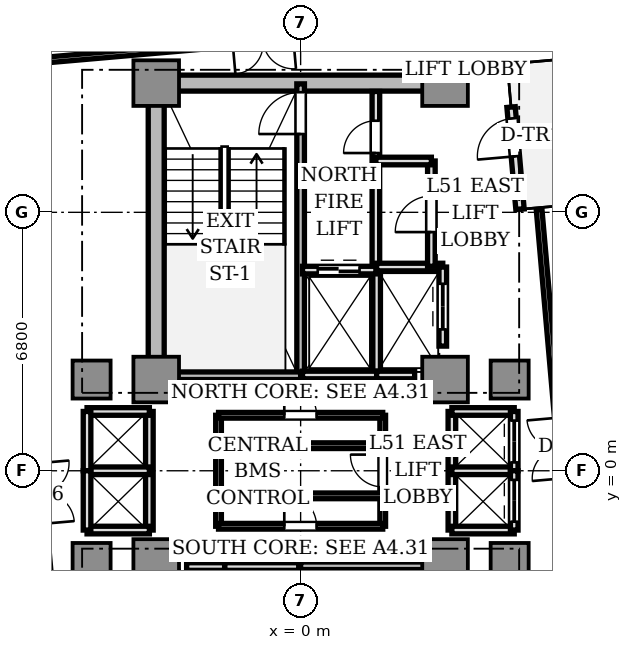
"""IFC4 building model, lengths in metres.
Left out: names, types, materials, properties, quantities, classifications, styles, units other than length and angle.
Written with IfcOpenShell. Run it as: python <this file> out.ifc"""

import sys

from ifc_helpers import new_model, si_unit, direction, frame, frame_2d, origin, origin_2d, place, context, subcontext, project, spatial, rectangle, extrude, source, transform, mapped, element, fill, save


model = new_model("IFC4")
c1 = context("Model", 3, precision=1e-05, world=origin(), true_north=direction((0.0, 1.0)))
c2 = subcontext(c1, "Body", "Model", "MODEL_VIEW")
j1 = project(units=[si_unit("LENGTHUNIT", "METRE"), si_unit("PLANEANGLEUNIT", "RADIAN")], contexts=[c1])
p1 = place(None, origin())
s1 = spatial("IfcSite", under=j1, at=p1, CompositionType="ELEMENT")
p2 = place(p1, origin())
s2 = spatial("IfcBuilding", under=s1, at=p2, CompositionType="ELEMENT")
p3 = place(p2, frame((0.0, 0.0, 185.25)))
s3 = spatial("IfcBuildingStorey", under=s2, at=p3, CompositionType="ELEMENT", Elevation=185.25)
p4 = place(p3, frame((-3.55, 10.2, 0.0), z_axis=(0.0, 0.0, 1.0), x_axis=(1.0, 0.0, 0.0)))
e1 = element("IfcWall", 1, at=p4, inside=s3, PredefinedType="SHEAR", context=c2, shape_type="SweptSolid", body=[
    extrude(rectangle(XDim=7.1, YDim=0.42, at=frame_2d((3.55, 0.0))), origin(), (0.0, 0.0, 1.0), 3.11),
])
p5 = place(p3, frame((-3.8, 2.85, 0.0), z_axis=(0.0, 0.0, 1.0), x_axis=(0.0, 1.0, 0.0)))
e2 = element("IfcWall", 2, at=p5, inside=s3, PredefinedType="SHEAR", context=c2, shape_type="SweptSolid", body=[
    extrude(rectangle(XDim=6.9, YDim=0.42, at=frame_2d((3.45, 0.0))), origin(), (0.0, 0.0, 1.0), 3.11),
])
m1 = source(origin(), c2, "Body", "SweptSolid", [
    extrude(rectangle(XDim=1.2, YDim=1.2, at=origin_2d()), origin(), (0.0, 0.0, 1.0), 3.11),
])
for number, where, z_axis, x_axis in (
    (3, (-3.8, 2.4, 0.0), (0.0, 0.0, 1.0), (1.0, 0.0, 0.0)),
    (4, (3.8, 2.4, 0.0), (0.0, 0.0, 1.0), (1.0, 0.0, 0.0)),
    (5, (-3.8, 10.2, 0.0), (0.0, 0.0, 1.0), (1.0, 0.0, 0.0)),
    (6, (3.8, 10.2, 0.0), (0.0, 0.0, 1.0), (1.0, 0.0, 0.0)),
    (7, (-3.8, -2.4, 0.0), (0.0, 0.0, 1.0), (1.0, 0.0, 0.0)),
    (8, (3.8, -2.4, 0.0), (0.0, 0.0, 1.0), (1.0, 0.0, 0.0)),
):
    element("IfcColumn", number, at=place(p3, frame(where, z_axis=z_axis, x_axis=x_axis)), inside=s3, PredefinedType="COLUMN", context=c2, shape_type="MappedRepresentation", body=[
        mapped(m1, transform((0.0, 0.0, 0.0), scale=1.0)),
    ])
m2 = source(origin(), c2, "Body", "SweptSolid", [
    extrude(rectangle(XDim=1.0, YDim=1.0, at=origin_2d()), origin(), (0.0, 0.0, 1.0), 3.11),
])
for number, where, z_axis, x_axis in (
    (9, (5.5, 2.4, 0.0), (0.0, 0.0, 1.0), (1.0, 0.0, 0.0)),
    (10, (-5.5, 2.4, 0.0), (0.0, 0.0, 1.0), (1.0, 0.0, 0.0)),
    (11, (5.5, -2.4, 0.0), (0.0, 0.0, 1.0), (1.0, 0.0, 0.0)),
    (12, (-5.5, -2.4, 0.0), (0.0, 0.0, 1.0), (1.0, 0.0, 0.0)),
):
    element("IfcColumn", number, at=place(p3, frame(where, z_axis=z_axis, x_axis=x_axis)), inside=s3, PredefinedType="COLUMN", context=c2, shape_type="MappedRepresentation", body=[
        mapped(m2, transform((0.0, 0.0, 0.0), scale=1.0)),
    ])
p6 = place(p3, frame((5.772, 6.879, 0.0), z_axis=(0.0, 0.0, 1.0), x_axis=(-0.087168071984, 0.996193619346, 0.0)))
e13 = element("IfcWall", 13, at=p6, inside=s3, PredefinedType="STANDARD", context=c2, shape_type="SweptSolid", body=[
    extrude(rectangle(XDim=2.7, YDim=0.22, at=frame_2d((1.35, 0.0))), origin(), (0.0, 0.0, 1.0), 3.11),
])
p7 = place(p6, frame((1.4, 0.0, 0.0)))
e14 = element("IfcOpeningElement", 14, at=p7, cuts=e13, PredefinedType="OPENING", context=c2, shape_type="SweptSolid", body=[
    extrude(rectangle(XDim=1.0, YDim=2.2, at=frame_2d((0.5, 1.1))), frame((0.0, 0.12, 0.0), z_axis=(0.0, -1.0, 0.0), x_axis=(1.0, 0.0, 0.0)), (0.0, 0.0, 1.0), 0.24),
])
p8 = place(p3, frame((0.0, 2.5, 0.0), z_axis=(0.0, 0.0, 1.0), x_axis=(0.0, 1.0, 0.0)))
e15 = element("IfcWall", 15, at=p8, inside=s3, PredefinedType="SOLIDWALL", context=c2, shape_type="SweptSolid", body=[
    extrude(rectangle(XDim=7.68, YDim=0.2, at=frame_2d((3.84, 0.0))), origin(), (0.0, 0.0, 1.0), 3.11),
])
p9 = place(p8, frame((6.36, 0.0, 0.0)))
e16 = element("IfcOpeningElement", 16, at=p9, cuts=e15, PredefinedType="OPENING", context=c2, shape_type="SweptSolid", body=[
    extrude(rectangle(XDim=1.1, YDim=2.15, at=frame_2d((0.55, 1.075))), frame((0.0, 0.11, 0.0), z_axis=(0.0, -1.0, 0.0), x_axis=(1.0, 0.0, 0.0)), (0.0, 0.0, 1.0), 0.22),
])
p10 = place(p3, frame((-3.72, 2.5, 0.0), z_axis=(0.0, 0.0, 1.0), x_axis=(1.0, 0.0, 0.0)))
e17 = element("IfcWall", 17, at=p10, inside=s3, PredefinedType="SOLIDWALL", context=c2, shape_type="SweptSolid", body=[
    extrude(rectangle(XDim=3.72, YDim=0.2, at=frame_2d((1.86, 0.0))), origin(), (0.0, 0.0, 1.0), 3.11),
])
p11 = place(p3, frame((0.0, -10.18, 0.0), z_axis=(0.0, 0.0, 1.0), x_axis=(0.0, 1.0, 0.0)))
e18 = element("IfcWall", 18, at=p11, inside=s3, PredefinedType="SOLIDWALL", context=c2, shape_type="SweptSolid", body=[
    extrude(rectangle(XDim=7.68, YDim=0.2, at=frame_2d((3.84, 0.0))), origin(), (0.0, 0.0, 1.0), 3.11),
])
p12 = place(p11, frame((0.28, 0.0, 0.0)))
e19 = element("IfcOpeningElement", 19, at=p12, cuts=e18, PredefinedType="OPENING", context=c2, shape_type="SweptSolid", body=[
    extrude(rectangle(XDim=1.1, YDim=2.15, at=frame_2d((0.55, 1.075))), frame((0.0, 0.11, 0.0), z_axis=(0.0, -1.0, 0.0), x_axis=(1.0, 0.0, 0.0)), (0.0, 0.0, 1.0), 0.22),
])
p13 = place(p3, frame((0.0, -2.5, 0.0), z_axis=(0.0, 0.0, 1.0), x_axis=(1.0, 0.0, 0.0)))
e20 = element("IfcWall", 20, at=p13, inside=s3, PredefinedType="SOLIDWALL", context=c2, shape_type="SweptSolid", body=[
    extrude(rectangle(XDim=3.72, YDim=0.2, at=frame_2d((1.86, 0.0))), origin(), (0.0, 0.0, 1.0), 3.11),
])
p14 = place(p3, frame((1.98, 5.32, 0.0), z_axis=(0.0, 0.0, 1.0), x_axis=(0.0, 1.0, 0.0)))
e21 = element("IfcWall", 21, at=p14, inside=s3, PredefinedType="SOLIDWALL", context=c2, shape_type="SweptSolid", body=[
    extrude(rectangle(XDim=4.66, YDim=0.2, at=frame_2d((2.33, 0.0))), origin(), (0.0, 0.0, 1.0), 2.66),
])
p15 = place(p14, frame((3.04, 0.0, 0.0)))
e22 = element("IfcOpeningElement", 22, at=p15, cuts=e21, PredefinedType="OPENING", context=c2, shape_type="SweptSolid", body=[
    extrude(rectangle(XDim=0.85, YDim=2.1, at=frame_2d((0.425, 1.05))), frame((0.0, 0.11, 0.0), z_axis=(0.0, -1.0, 0.0), x_axis=(1.0, 0.0, 0.0)), (0.0, 0.0, 1.0), 0.22),
])
p16 = place(p3, frame((2.0, 2.5, 0.0), z_axis=(0.0, 0.0, 1.0), x_axis=(0.0, 1.0, 0.0)))
e23 = element("IfcWall", 23, at=p16, inside=s3, PredefinedType="SOLIDWALL", context=c2, shape_type="SweptSolid", body=[
    extrude(rectangle(XDim=2.78, YDim=0.2, at=frame_2d((1.39, 0.0))), origin(), (0.0, 0.0, 1.0), 2.66),
])
p17 = place(p3, frame((0.05, 2.52, 0.0), z_axis=(0.0, 0.0, 1.0), x_axis=(1.0, 0.0, 0.0)))
e24 = element("IfcWall", 24, at=p17, inside=s3, PredefinedType="SOLIDWALL", context=c2, shape_type="SweptSolid", body=[
    extrude(rectangle(XDim=1.95, YDim=0.2, at=frame_2d((0.975, 0.0))), origin(), (0.0, 0.0, 1.0), 2.66),
])
p18 = place(p3, frame((0.05, 5.28, 0.0), z_axis=(0.0, 0.0, 1.0), x_axis=(1.0, 0.0, 0.0)))
e25 = element("IfcWall", 25, at=p18, inside=s3, PredefinedType="SOLIDWALL", context=c2, shape_type="SweptSolid", body=[
    extrude(rectangle(XDim=1.93, YDim=0.2, at=frame_2d((0.965, 0.0))), origin(), (0.0, 0.0, 1.0), 2.66),
])
p19 = place(p18, frame((0.4, 0.0, 0.0)))
e26 = element("IfcOpeningElement", 26, at=p19, cuts=e25, PredefinedType="OPENING", context=c2, shape_type="SweptSolid", body=[
    extrude(rectangle(XDim=1.1, YDim=2.2, at=frame_2d((0.55, 1.1))), frame((0.0, 0.11, 0.0), z_axis=(0.0, -1.0, 0.0), x_axis=(1.0, 0.0, 0.0)), (0.0, 0.0, 1.0), 0.22),
])
p20 = place(p3, frame((-2.0, -5.28, 0.0), z_axis=(0.0, 0.0, 1.0), x_axis=(0.0, 1.0, 0.0)))
e27 = element("IfcWall", 27, at=p20, inside=s3, PredefinedType="SOLIDWALL", context=c2, shape_type="SweptSolid", body=[
    extrude(rectangle(XDim=2.78, YDim=0.2, at=frame_2d((1.39, 0.0))), origin(), (0.0, 0.0, 1.0), 2.66),
])
p21 = place(p3, frame((-2.0, -2.52, 0.0), z_axis=(0.0, 0.0, 1.0), x_axis=(1.0, 0.0, 0.0)))
e28 = element("IfcWall", 28, at=p21, inside=s3, PredefinedType="SOLIDWALL", context=c2, shape_type="SweptSolid", body=[
    extrude(rectangle(XDim=1.95, YDim=0.2, at=frame_2d((0.975, 0.0))), origin(), (0.0, 0.0, 1.0), 2.66),
])
p22 = place(p3, frame((2.0, 2.52, 0.0), z_axis=(0.0, 0.0, 1.0), x_axis=(1.0, 0.0, 0.0)))
e29 = element("IfcWall", 29, at=p22, inside=s3, PredefinedType="SOLIDWALL", context=c2, shape_type="SweptSolid", body=[
    extrude(rectangle(XDim=1.0, YDim=0.2, at=frame_2d((0.5, 0.0))), origin(), (0.0, 0.0, 1.0), 2.66),
])
p23 = place(p3, frame((2.0, 5.36, 0.0), z_axis=(0.0, 0.0, 1.0), x_axis=(1.0, 0.0, 0.0)))
e30 = element("IfcWall", 30, at=p23, inside=s3, PredefinedType="SOLIDWALL", context=c2, shape_type="SweptSolid", body=[
    extrude(rectangle(XDim=1.74, YDim=0.2, at=frame_2d((0.87, 0.0))), origin(), (0.0, 0.0, 1.0), 2.66),
])
p24 = place(p3, frame((3.74, 3.28, 0.0), z_axis=(0.0, 0.0, 1.0), x_axis=(0.0, 1.0, 0.0)))
e31 = element("IfcWall", 31, at=p24, inside=s3, PredefinedType="SOLIDWALL", context=c2, shape_type="SweptSolid", body=[
    extrude(rectangle(XDim=2.08, YDim=0.2, at=frame_2d((1.04, 0.0))), origin(), (0.0, 0.0, 1.0), 2.66),
])
p25 = place(p24, frame((0.44, 0.0, 0.0)))
e32 = element("IfcOpeningElement", 32, at=p25, cuts=e31, PredefinedType="OPENING", context=c2, shape_type="SweptSolid", body=[
    extrude(rectangle(XDim=1.2, YDim=2.2, at=frame_2d((0.6, 1.1))), frame((0.0, 0.11, 0.0), z_axis=(0.0, -1.0, 0.0), x_axis=(1.0, 0.0, 0.0)), (0.0, 0.0, 1.0), 0.22),
])
p26 = place(p3, frame((-3.0, -2.52, 0.0), z_axis=(0.0, 0.0, 1.0), x_axis=(1.0, 0.0, 0.0)))
e33 = element("IfcWall", 33, at=p26, inside=s3, PredefinedType="SOLIDWALL", context=c2, shape_type="SweptSolid", body=[
    extrude(rectangle(XDim=1.0, YDim=0.2, at=frame_2d((0.5, 0.0))), origin(), (0.0, 0.0, 1.0), 2.66),
])
p27 = place(p3, frame((3.98, -1.56, 0.0), z_axis=(0.0, 0.0, 1.0), x_axis=(0.0, 1.0, 0.0)))
e34 = element("IfcWall", 34, at=p27, inside=s3, PredefinedType="SOLIDWALL", context=c2, shape_type="SweptSolid", body=[
    extrude(rectangle(XDim=3.12, YDim=0.2, at=frame_2d((1.56, 0.0))), origin(), (0.0, 0.0, 1.0), 2.28),
])
for number, where, z_axis, x_axis in (
    (35, (3.98, 1.56, 0.0), (0.0, 0.0, 1.0), (1.0, 0.0, 0.0)),
    (36, (3.98, -1.56, 0.0), (0.0, 0.0, 1.0), (1.0, 0.0, 0.0)),
    (37, (3.98, 0.0, 0.0), (0.0, 0.0, 1.0), (1.0, 0.0, 0.0)),
):
    element("IfcWall", number, at=place(p3, frame(where, z_axis=z_axis, x_axis=x_axis)), inside=s3, PredefinedType="SOLIDWALL", context=c2, shape_type="SweptSolid", body=[
        extrude(rectangle(XDim=1.64, YDim=0.2, at=frame_2d((0.82, 0.0))), origin(), (0.0, 0.0, 1.0), 2.66),
    ])
p28 = place(p3, frame((5.62, 0.0, 0.0), z_axis=(0.0, 0.0, 1.0), x_axis=(0.0, 1.0, 0.0)))
e38 = element("IfcWall", 38, at=p28, inside=s3, PredefinedType="SOLIDWALL", context=c2, shape_type="SweptSolid", body=[
    extrude(rectangle(XDim=1.56, YDim=0.2, at=frame_2d((0.78, 0.0))), origin(), (0.0, 0.0, 1.0), 2.66),
])
p29 = place(p28, frame((0.22, 0.0, 0.0)))
e39 = element("IfcOpeningElement", 39, at=p29, cuts=e38, PredefinedType="OPENING", context=c2, shape_type="SweptSolid", body=[
    extrude(rectangle(XDim=1.1, YDim=2.2, at=frame_2d((0.55, 1.1))), frame((0.0, 0.11, 0.0), z_axis=(0.0, -1.0, 0.0), x_axis=(1.0, 0.0, 0.0)), (0.0, 0.0, 1.0), 0.22),
])
p30 = place(p3, frame((5.62, -1.56, 0.0), z_axis=(0.0, 0.0, 1.0), x_axis=(0.0, 1.0, 0.0)))
e40 = element("IfcWall", 40, at=p30, inside=s3, PredefinedType="SOLIDWALL", context=c2, shape_type="SweptSolid", body=[
    extrude(rectangle(XDim=1.56, YDim=0.2, at=frame_2d((0.78, 0.0))), origin(), (0.0, 0.0, 1.0), 2.66),
])
p31 = place(p30, frame((0.22, 0.0, 0.0)))
e41 = element("IfcOpeningElement", 41, at=p31, cuts=e40, PredefinedType="OPENING", context=c2, shape_type="SweptSolid", body=[
    extrude(rectangle(XDim=1.1, YDim=2.2, at=frame_2d((0.55, 1.1))), frame((0.0, 0.11, 0.0), z_axis=(0.0, -1.0, 0.0), x_axis=(1.0, 0.0, 0.0)), (0.0, 0.0, 1.0), 0.22),
])
p32 = place(p3, frame((-3.98, -1.56, 0.0), z_axis=(0.0, 0.0, 1.0), x_axis=(0.0, 1.0, 0.0)))
e42 = element("IfcWall", 42, at=p32, inside=s3, PredefinedType="SOLIDWALL", context=c2, shape_type="SweptSolid", body=[
    extrude(rectangle(XDim=3.12, YDim=0.2, at=frame_2d((1.56, 0.0))), origin(), (0.0, 0.0, 1.0), 2.28),
])
for number, where, z_axis, x_axis in (
    (43, (-5.62, 1.56, 0.0), (0.0, 0.0, 1.0), (1.0, 0.0, 0.0)),
    (44, (-5.62, -1.56, 0.0), (0.0, 0.0, 1.0), (1.0, 0.0, 0.0)),
    (45, (-5.62, 0.0, 0.0), (0.0, 0.0, 1.0), (1.0, 0.0, 0.0)),
):
    element("IfcWall", number, at=place(p3, frame(where, z_axis=z_axis, x_axis=x_axis)), inside=s3, PredefinedType="SOLIDWALL", context=c2, shape_type="SweptSolid", body=[
        extrude(rectangle(XDim=1.64, YDim=0.2, at=frame_2d((0.82, 0.0))), origin(), (0.0, 0.0, 1.0), 2.66),
    ])
for number, where, z_axis, x_axis in (
    (46, (-5.62, 0.0, 0.0), (0.0, 0.0, 1.0), (0.0, 1.0, 0.0)),
    (47, (-5.62, -1.56, 0.0), (0.0, 0.0, 1.0), (0.0, 1.0, 0.0)),
):
    element("IfcWall", number, at=place(p3, frame(where, z_axis=z_axis, x_axis=x_axis)), inside=s3, PredefinedType="SOLIDWALL", context=c2, shape_type="SweptSolid", body=[
        extrude(rectangle(XDim=1.56, YDim=0.2, at=frame_2d((0.78, 0.0))), origin(), (0.0, 0.0, 1.0), 2.66),
    ])
p33 = place(p3, frame((3.44, 5.38, 0.0), z_axis=(0.0, 0.0, 1.0), x_axis=(0.0, 1.0, 0.0)))
e48 = element("IfcWall", 48, at=p33, inside=s3, PredefinedType="SOLIDWALL", context=c2, shape_type="SweptSolid", body=[
    extrude(rectangle(XDim=2.77, YDim=0.2, at=frame_2d((1.385, 0.0))), origin(), (0.0, 0.0, 1.0), 2.66),
])
p34 = place(p33, frame((0.9, 0.0, 0.0)))
e49 = element("IfcOpeningElement", 49, at=p34, cuts=e48, PredefinedType="OPENING", context=c2, shape_type="SweptSolid", body=[
    extrude(rectangle(XDim=0.95, YDim=2.15, at=frame_2d((0.475, 1.075))), frame((0.0, 0.11, 0.0), z_axis=(0.0, -1.0, 0.0), x_axis=(1.0, 0.0, 0.0)), (0.0, 0.0, 1.0), 0.22),
])
p35 = place(p3, frame((1.98, 8.15, 0.0), z_axis=(0.0, 0.0, 1.0), x_axis=(1.0, 0.0, 0.0)))
e50 = element("IfcWall", 50, at=p35, inside=s3, PredefinedType="SOLIDWALL", context=c2, shape_type="SweptSolid", body=[
    extrude(rectangle(XDim=1.46, YDim=0.2, at=frame_2d((0.73, 0.0))), origin(), (0.0, 0.0, 1.0), 2.66),
])
p36 = place(p3, frame((2.16, -1.46, 0.0), z_axis=(0.0, 0.0, 1.0), x_axis=(0.0, 1.0, 0.0)))
e51 = element("IfcWall", 51, at=p36, inside=s3, PredefinedType="PARTITIONING", context=c2, shape_type="SweptSolid", body=[
    extrude(rectangle(XDim=2.92, YDim=0.15, at=frame_2d((1.46, 0.0))), origin(), (0.0, 0.0, 1.0), 2.66),
])
p37 = place(p36, frame((1.035, 0.0, 0.0)))
e52 = element("IfcOpeningElement", 52, at=p37, cuts=e51, PredefinedType="OPENING", context=c2, shape_type="SweptSolid", body=[
    extrude(rectangle(XDim=0.85, YDim=2.1, at=frame_2d((0.425, 1.05))), frame((0.0, 0.085, 0.0), z_axis=(0.0, -1.0, 0.0), x_axis=(1.0, 0.0, 0.0)), (0.0, 0.0, 1.0), 0.17),
])
p38 = place(p3, frame((-2.16, -1.46, 0.0), z_axis=(0.0, 0.0, 1.0), x_axis=(0.0, 1.0, 0.0)))
e53 = element("IfcWall", 53, at=p38, inside=s3, PredefinedType="PARTITIONING", context=c2, shape_type="SweptSolid", body=[
    extrude(rectangle(XDim=2.92, YDim=0.15, at=frame_2d((1.46, 0.0))), origin(), (0.0, 0.0, 1.0), 2.66),
])
p39 = place(p3, frame((-2.16, 1.46, 0.0), z_axis=(0.0, 0.0, 1.0), x_axis=(1.0, 0.0, 0.0)))
e54 = element("IfcWall", 54, at=p39, inside=s3, PredefinedType="PARTITIONING", context=c2, shape_type="SweptSolid", body=[
    extrude(rectangle(XDim=4.32, YDim=0.15, at=frame_2d((2.16, 0.0))), origin(), (0.0, 0.0, 1.0), 2.66),
])
p40 = place(p39, frame((1.73, 0.0, 0.0)))
e55 = element("IfcOpeningElement", 55, at=p40, cuts=e54, PredefinedType="OPENING", context=c2, shape_type="SweptSolid", body=[
    extrude(rectangle(XDim=0.85, YDim=2.1, at=frame_2d((0.425, 1.05))), frame((0.0, 0.085, 0.0), z_axis=(0.0, -1.0, 0.0), x_axis=(1.0, 0.0, 0.0)), (0.0, 0.0, 1.0), 0.17),
])
p41 = place(p3, frame((-2.16, -1.46, 0.0), z_axis=(0.0, 0.0, 1.0), x_axis=(1.0, 0.0, 0.0)))
e56 = element("IfcWall", 56, at=p41, inside=s3, PredefinedType="PARTITIONING", context=c2, shape_type="SweptSolid", body=[
    extrude(rectangle(XDim=4.32, YDim=0.15, at=frame_2d((2.16, 0.0))), origin(), (0.0, 0.0, 1.0), 2.66),
])
p42 = place(p41, frame((1.73, 0.0, 0.0)))
e57 = element("IfcOpeningElement", 57, at=p42, cuts=e56, PredefinedType="OPENING", context=c2, shape_type="SweptSolid", body=[
    extrude(rectangle(XDim=0.85, YDim=2.1, at=frame_2d((0.425, 1.05))), frame((0.0, 0.085, 0.0), z_axis=(0.0, -1.0, 0.0), x_axis=(1.0, 0.0, 0.0)), (0.0, 0.0, 1.0), 0.17),
])
for number, where, z_axis, x_axis in (
    (58, (-2.16, 0.66, 0.0), (0.0, 0.0, 1.0), (1.0, 0.0, 0.0)),
    (59, (-2.16, -0.66, 0.0), (0.0, 0.0, 1.0), (1.0, 0.0, 0.0)),
):
    element("IfcWall", number, at=place(p3, frame(where, z_axis=z_axis, x_axis=x_axis)), inside=s3, PredefinedType="PARTITIONING", context=c2, shape_type="SweptSolid", body=[
        extrude(rectangle(XDim=4.32, YDim=0.15, at=frame_2d((2.16, 0.0))), origin(), (0.0, 0.0, 1.0), 2.66),
    ])
p43 = place(p3, frame((7.373, -5.679, 0.0), z_axis=(0.0, 0.0, 1.0), x_axis=(-0.087154691724, 0.996194790044, 0.0)))
e60 = element("IfcWall", 60, at=p43, inside=s3, PredefinedType="PARTITIONING", context=c2, shape_type="SweptSolid", body=[
    extrude(rectangle(XDim=12.6, YDim=0.15, at=frame_2d((6.3, 0.0))), origin(), (0.0, 0.0, 1.0), 2.66),
])
p44 = place(p43, frame((5.5, 0.0, 0.0)))
e61 = element("IfcOpeningElement", 61, at=p44, cuts=e60, PredefinedType="OPENING", context=c2, shape_type="SweptSolid", body=[
    extrude(rectangle(XDim=1.6, YDim=2.25, at=frame_2d((0.8, 1.125))), frame((0.0, 0.085, 0.0), z_axis=(0.0, -1.0, 0.0), x_axis=(1.0, 0.0, 0.0)), (0.0, 0.0, 1.0), 0.17),
])
p45 = place(p3, frame((5.287, 11.856, 0.0), z_axis=(0.0, 0.0, 1.0), x_axis=(-0.996194790044, -0.087154691724, 0.0)))
e62 = element("IfcWall", 62, at=p45, inside=s3, PredefinedType="PARTITIONING", context=c2, shape_type="SweptSolid", body=[
    extrude(rectangle(XDim=12.6, YDim=0.15, at=frame_2d((6.3, 0.0))), origin(), (0.0, 0.0, 1.0), 2.66),
])
p46 = place(p45, frame((5.5, 0.0, 0.0)))
e63 = element("IfcOpeningElement", 63, at=p46, cuts=e62, PredefinedType="OPENING", context=c2, shape_type="SweptSolid", body=[
    extrude(rectangle(XDim=1.6, YDim=2.25, at=frame_2d((0.8, 1.125))), frame((0.0, 0.085, 0.0), z_axis=(0.0, -1.0, 0.0), x_axis=(1.0, 0.0, 0.0)), (0.0, 0.0, 1.0), 0.17),
])
p47 = place(p3, frame((-7.373, 5.679, 0.0), z_axis=(0.0, 0.0, 1.0), x_axis=(0.087154691724, -0.996194790044, 0.0)))
e64 = element("IfcWall", 64, at=p47, inside=s3, PredefinedType="PARTITIONING", context=c2, shape_type="SweptSolid", body=[
    extrude(rectangle(XDim=12.6, YDim=0.15, at=frame_2d((6.3, 0.0))), origin(), (0.0, 0.0, 1.0), 2.66),
])
p48 = place(p47, frame((5.5, 0.0, 0.0)))
e65 = element("IfcOpeningElement", 65, at=p48, cuts=e64, PredefinedType="OPENING", context=c2, shape_type="SweptSolid", body=[
    extrude(rectangle(XDim=1.6, YDim=2.25, at=frame_2d((0.8, 1.125))), frame((0.0, 0.085, 0.0), z_axis=(0.0, -1.0, 0.0), x_axis=(1.0, 0.0, 0.0)), (0.0, 0.0, 1.0), 0.17),
])
m3 = source(origin(), c2, "Body", "SweptSolid", [
    extrude(rectangle(XDim=1.0, YDim=0.05, at=origin_2d()), origin(), (0.0, 0.0, 1.0), 2.2),
])
p49 = place(p7, frame((0.5, 0.0, 0.0)))
e66 = element("IfcDoor", 66, at=p49, inside=s3, OperationType="SINGLE_SWING_LEFT", PredefinedType="DOOR", context=c2, shape_type="MappedRepresentation", body=[
    mapped(m3, transform((0.0, 0.0, 0.0), scale=1.0)),
])
fill(e14, e66)
m4 = source(origin(), c2, "Body", "SweptSolid", [
    extrude(rectangle(XDim=1.1, YDim=0.05, at=origin_2d()), origin(), (0.0, 0.0, 1.0), 2.15),
])
p50 = place(p9, frame((0.55, 0.0, 0.0)))
e67 = element("IfcDoor", 67, at=p50, inside=s3, OperationType="SINGLE_SWING_LEFT", PredefinedType="DOOR", context=c2, shape_type="MappedRepresentation", body=[
    mapped(m4, transform((0.0, 0.0, 0.0), scale=1.0)),
])
fill(e16, e67)
m5 = source(origin(), c2, "Body", "SweptSolid", [
    extrude(rectangle(XDim=0.85, YDim=0.05, at=origin_2d()), origin(), (0.0, 0.0, 1.0), 2.1),
])
p51 = place(p15, frame((0.425, 0.0, 0.0)))
e68 = element("IfcDoor", 68, at=p51, inside=s3, OperationType="SINGLE_SWING_LEFT", PredefinedType="DOOR", context=c2, shape_type="MappedRepresentation", body=[
    mapped(m5, transform((0.0, 0.0, 0.0), scale=1.0)),
])
fill(e22, e68)
m6 = source(origin(), c2, "Body", "SweptSolid", [
    extrude(rectangle(XDim=1.1, YDim=0.05, at=origin_2d()), origin(), (0.0, 0.0, 1.0), 2.2),
])
p52 = place(p19, frame((0.55, 0.0, 0.0)))
e69 = element("IfcDoor", 69, at=p52, inside=s3, OperationType="DOUBLE_DOOR_SLIDING", PredefinedType="DOOR", context=c2, shape_type="MappedRepresentation", body=[
    mapped(m6, transform((0.0, 0.0, 0.0), scale=1.0)),
])
fill(e26, e69)
m7 = source(origin(), c2, "Body", "SweptSolid", [
    extrude(rectangle(XDim=1.2, YDim=0.05, at=origin_2d()), origin(), (0.0, 0.0, 1.0), 2.2),
])
p53 = place(p25, frame((0.6, 0.0, 0.0)))
e70 = element("IfcDoor", 70, at=p53, inside=s3, OperationType="DOUBLE_DOOR_SLIDING", PredefinedType="DOOR", context=c2, shape_type="MappedRepresentation", body=[
    mapped(m7, transform((0.0, 0.0, 0.0), scale=1.0)),
])
fill(e32, e70)
p54 = place(p29, frame((0.55, 0.0, 0.0)))
e71 = element("IfcDoor", 71, at=p54, inside=s3, OperationType="DOUBLE_DOOR_SLIDING", PredefinedType="DOOR", context=c2, shape_type="MappedRepresentation", body=[
    mapped(m6, transform((0.0, 0.0, 0.0), scale=1.0)),
])
fill(e39, e71)
p55 = place(p31, frame((0.55, 0.0, 0.0)))
e72 = element("IfcDoor", 72, at=p55, inside=s3, OperationType="DOUBLE_DOOR_SLIDING", PredefinedType="DOOR", context=c2, shape_type="MappedRepresentation", body=[
    mapped(m6, transform((0.0, 0.0, 0.0), scale=1.0)),
])
fill(e41, e72)
m8 = source(origin(), c2, "Body", "SweptSolid", [
    extrude(rectangle(XDim=0.95, YDim=0.05, at=origin_2d()), origin(), (0.0, 0.0, 1.0), 2.15),
])
p56 = place(p34, frame((0.475, 0.0, 0.0)))
e73 = element("IfcDoor", 73, at=p56, inside=s3, OperationType="SINGLE_SWING_LEFT", PredefinedType="DOOR", context=c2, shape_type="MappedRepresentation", body=[
    mapped(m8, transform((0.0, 0.0, 0.0), scale=1.0)),
])
fill(e49, e73)
p57 = place(p40, frame((0.425, 0.0, 0.0)))
e74 = element("IfcDoor", 74, at=p57, inside=s3, OperationType="SINGLE_SWING_LEFT", PredefinedType="DOOR", context=c2, shape_type="MappedRepresentation", body=[
    mapped(m5, transform((0.0, 0.0, 0.0), scale=1.0)),
])
fill(e55, e74)
p58 = place(p37, frame((0.425, 0.0, 0.0)))
e75 = element("IfcDoor", 75, at=p58, inside=s3, OperationType="SINGLE_SWING_RIGHT", PredefinedType="DOOR", context=c2, shape_type="MappedRepresentation", body=[
    mapped(m5, transform((0.0, 0.0, 0.0), scale=1.0)),
])
fill(e52, e75)
p59 = place(p42, frame((0.425, 0.0, 0.0)))
e76 = element("IfcDoor", 76, at=p59, inside=s3, OperationType="SINGLE_SWING_LEFT", PredefinedType="DOOR", context=c2, shape_type="MappedRepresentation", body=[
    mapped(m5, transform((0.0, 0.0, 0.0), scale=1.0)),
])
fill(e57, e76)
save(model, sys.argv[1])
